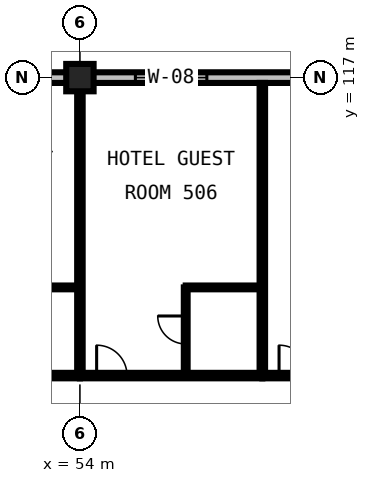
"""IFC4 building model, lengths in metres.
Left out: names, types, materials, properties, quantities, classifications, styles, units other than length and angle.
Written with IfcOpenShell. Run it as: python <this file> out.ifc"""

import sys

from ifc_helpers import new_model, si_unit, direction, frame, frame_2d, origin, origin_2d, place, context, subcontext, project, spatial, rectangle, extrude, element, fill, save


model = new_model("IFC4")
c1 = context("Model", 3, precision=1e-05, world=origin(), true_north=direction((0.0, 1.0)))
c2 = subcontext(c1, "Body", "Model", "MODEL_VIEW")
j1 = project(units=[si_unit("LENGTHUNIT", "METRE"), si_unit("PLANEANGLEUNIT", "RADIAN")], contexts=[c1])
p1 = place(None, origin())
s1 = spatial("IfcSite", under=j1, at=p1, CompositionType="ELEMENT")
p2 = place(p1, origin())
s2 = spatial("IfcBuilding", under=s1, at=p2, CompositionType="ELEMENT")
p3 = place(p2, frame((0.0, 0.0, 27.6)))
s3 = spatial("IfcBuildingStorey", under=s2, at=p3, CompositionType="ELEMENT", Elevation=27.6)
p4 = place(p3, frame((54.0, 117.0, 0.0), z_axis=(0.0, 0.0, 1.0), x_axis=(1.0, 0.0, 0.0)))
e1 = element("IfcColumn", 1, at=p4, inside=s3, PredefinedType="COLUMN", context=c2, shape_type="SweptSolid", body=[
    extrude(rectangle(XDim=0.9, YDim=0.9, at=origin_2d()), origin(), (0.0, 0.0, 1.0), 3.6),
])
p5 = place(p3, frame((54.0, 117.0, 0.0), z_axis=(0.0, 0.0, 1.0), x_axis=(-1.0, 0.0, 0.0)))
e2 = element("IfcWall", 2, at=p5, inside=s3, PredefinedType="STANDARD", context=c2, shape_type="SweptSolid", body=[
    extrude(rectangle(XDim=12.0, YDim=0.35, at=frame_2d((6.0, 0.0))), origin(), (0.0, 0.0, 1.0), 2.486),
])
p6 = place(p5, frame((1.9, 0.0, 0.75)))
e3 = element("IfcOpeningElement", 3, at=p6, cuts=e2, PredefinedType="OPENING", context=c2, shape_type="SweptSolid", body=[
    extrude(rectangle(XDim=2.2, YDim=1.6, at=frame_2d((1.1, 0.8))), frame((0.0, 0.19, 0.0), z_axis=(0.0, -1.0, 0.0), x_axis=(1.0, 0.0, 0.0)), (0.0, 0.0, 1.0), 0.38),
])
p7 = place(p5, frame((7.825, 0.0, 0.75)))
e4 = element("IfcOpeningElement", 4, at=p7, cuts=e2, PredefinedType="OPENING", context=c2, shape_type="SweptSolid", body=[
    extrude(rectangle(XDim=2.35, YDim=1.6, at=frame_2d((1.175, 0.8))), frame((0.0, 0.19, 0.0), z_axis=(0.0, -1.0, 0.0), x_axis=(1.0, 0.0, 0.0)), (0.0, 0.0, 1.0), 0.38),
])
p8 = place(p3, frame((66.0, 117.0, 0.0), z_axis=(0.0, 0.0, 1.0), x_axis=(-1.0, 0.0, 0.0)))
e5 = element("IfcWall", 5, at=p8, inside=s3, PredefinedType="STANDARD", context=c2, shape_type="SweptSolid", body=[
    extrude(rectangle(XDim=12.0, YDim=0.35, at=frame_2d((6.0, 0.0))), origin(), (0.0, 0.0, 1.0), 2.486),
])
p9 = place(p8, frame((1.9, 0.0, 0.75)))
e6 = element("IfcOpeningElement", 6, at=p9, cuts=e5, PredefinedType="OPENING", context=c2, shape_type="SweptSolid", body=[
    extrude(rectangle(XDim=2.2, YDim=1.6, at=frame_2d((1.1, 0.8))), frame((0.0, 0.19, 0.0), z_axis=(0.0, -1.0, 0.0), x_axis=(1.0, 0.0, 0.0)), (0.0, 0.0, 1.0), 0.38),
])
p10 = place(p8, frame((7.825, 0.0, 0.75)))
e7 = element("IfcOpeningElement", 7, at=p10, cuts=e5, PredefinedType="OPENING", context=c2, shape_type="SweptSolid", body=[
    extrude(rectangle(XDim=2.35, YDim=1.6, at=frame_2d((1.175, 0.8))), frame((0.0, 0.19, 0.0), z_axis=(0.0, -1.0, 0.0), x_axis=(1.0, 0.0, 0.0)), (0.0, 0.0, 1.0), 0.38),
])
p11 = place(p3, frame((48.0, 107.2, 0.0), z_axis=(0.0, 0.0, 1.0), x_axis=(1.0, 0.0, 0.0)))
e8 = element("IfcWall", 8, at=p11, inside=s3, PredefinedType="PARTITIONING", context=c2, shape_type="SweptSolid", body=[
    extrude(rectangle(XDim=6.0, YDim=0.18, at=frame_2d((3.0, 0.0))), origin(), (0.0, 0.0, 1.0), 3.29),
])
p12 = place(p11, frame((0.55, 0.0, 0.0)))
e9 = element("IfcOpeningElement", 9, at=p12, cuts=e8, PredefinedType="OPENING", context=c2, shape_type="SweptSolid", body=[
    extrude(rectangle(XDim=1.0, YDim=2.15, at=frame_2d((0.5, 1.075))), frame((0.0, 0.105, 0.0), z_axis=(0.0, -1.0, 0.0), x_axis=(1.0, 0.0, 0.0)), (0.0, 0.0, 1.0), 0.21),
])
p13 = place(p3, frame((54.0, 107.2, 0.0), z_axis=(0.0, 0.0, 1.0), x_axis=(0.0, 1.0, 0.0)))
e10 = element("IfcWall", 10, at=p13, inside=s3, PredefinedType="PARTITIONING", context=c2, shape_type="SweptSolid", body=[
    extrude(rectangle(XDim=9.625, YDim=0.18, at=frame_2d((4.812, 0.0))), origin(), (0.0, 0.0, 1.0), 2.59),
])
p14 = place(p3, frame((51.48, 110.1, 0.0), z_axis=(0.0, 0.0, 1.0), x_axis=(1.0, 0.0, 0.0)))
e11 = element("IfcWall", 11, at=p14, inside=s3, PredefinedType="PARTITIONING", context=c2, shape_type="SweptSolid", body=[
    extrude(rectangle(XDim=2.52, YDim=0.125, at=frame_2d((1.26, 0.0))), origin(), (0.0, 0.0, 1.0), 3.29),
])
p15 = place(p3, frame((54.0, 107.2, 0.0), z_axis=(0.0, 0.0, 1.0), x_axis=(1.0, 0.0, 0.0)))
e12 = element("IfcWall", 12, at=p15, inside=s3, PredefinedType="PARTITIONING", context=c2, shape_type="SweptSolid", body=[
    extrude(rectangle(XDim=6.0, YDim=0.18, at=frame_2d((3.0, 0.0))), origin(), (0.0, 0.0, 1.0), 3.29),
])
p16 = place(p15, frame((0.55, 0.0, 0.0)))
e13 = element("IfcOpeningElement", 13, at=p16, cuts=e12, PredefinedType="OPENING", context=c2, shape_type="SweptSolid", body=[
    extrude(rectangle(XDim=1.0, YDim=2.15, at=frame_2d((0.5, 1.075))), frame((0.0, 0.105, 0.0), z_axis=(0.0, -1.0, 0.0), x_axis=(1.0, 0.0, 0.0)), (0.0, 0.0, 1.0), 0.21),
])
p17 = place(p3, frame((60.0, 107.2, 0.0), z_axis=(0.0, 0.0, 1.0), x_axis=(0.0, 1.0, 0.0)))
e14 = element("IfcWall", 14, at=p17, inside=s3, PredefinedType="PARTITIONING", context=c2, shape_type="SweptSolid", body=[
    extrude(rectangle(XDim=9.625, YDim=0.18, at=frame_2d((4.812, 0.0))), origin(), (0.0, 0.0, 1.0), 3.29),
])
p18 = place(p3, frame((57.48, 107.29, 0.0), z_axis=(0.0, 0.0, 1.0), x_axis=(0.0, 1.0, 0.0)))
e15 = element("IfcWall", 15, at=p18, inside=s3, PredefinedType="PARTITIONING", context=c2, shape_type="SweptSolid", body=[
    extrude(rectangle(XDim=2.81, YDim=0.125, at=frame_2d((1.405, 0.0))), origin(), (0.0, 0.0, 1.0), 3.29),
])
p19 = place(p18, frame((0.95, 0.0, 0.0)))
e16 = element("IfcOpeningElement", 16, at=p19, cuts=e15, PredefinedType="OPENING", context=c2, shape_type="SweptSolid", body=[
    extrude(rectangle(XDim=0.92, YDim=2.1, at=frame_2d((0.46, 1.05))), frame((0.0, 0.077, 0.0), z_axis=(0.0, -1.0, 0.0), x_axis=(1.0, 0.0, 0.0)), (0.0, 0.0, 1.0), 0.155),
])
p20 = place(p3, frame((57.48, 110.1, 0.0), z_axis=(0.0, 0.0, 1.0), x_axis=(1.0, 0.0, 0.0)))
e17 = element("IfcWall", 17, at=p20, inside=s3, PredefinedType="PARTITIONING", context=c2, shape_type="SweptSolid", body=[
    extrude(rectangle(XDim=2.52, YDim=0.125, at=frame_2d((1.26, 0.0))), origin(), (0.0, 0.0, 1.0), 3.29),
])
p21 = place(p3, frame((60.0, 107.2, 0.0), z_axis=(0.0, 0.0, 1.0), x_axis=(1.0, 0.0, 0.0)))
e18 = element("IfcWall", 18, at=p21, inside=s3, PredefinedType="PARTITIONING", context=c2, shape_type="SweptSolid", body=[
    extrude(rectangle(XDim=6.0, YDim=0.18, at=frame_2d((3.0, 0.0))), origin(), (0.0, 0.0, 1.0), 3.29),
])
p22 = place(p21, frame((0.55, 0.0, 0.0)))
e19 = element("IfcOpeningElement", 19, at=p22, cuts=e18, PredefinedType="OPENING", context=c2, shape_type="SweptSolid", body=[
    extrude(rectangle(XDim=1.0, YDim=2.15, at=frame_2d((0.5, 1.075))), frame((0.0, 0.105, 0.0), z_axis=(0.0, -1.0, 0.0), x_axis=(1.0, 0.0, 0.0)), (0.0, 0.0, 1.0), 0.21),
])
p23 = place(p10, origin())
e20 = element("IfcWindow", 20, at=p23, inside=s3, PartitioningType="DOUBLE_PANEL_VERTICAL", PredefinedType="WINDOW", context=c2, shape_type="SweptSolid", body=[
    extrude(rectangle(XDim=2.35, YDim=1.6, at=frame_2d((1.175, 0.8))), frame((0.0, 0.03, 0.0), z_axis=(0.0, -1.0, 0.0), x_axis=(1.0, 0.0, 0.0)), (0.0, 0.0, 1.0), 0.06),
])
fill(e7, e20)
p24 = place(p16, origin())
e21 = element("IfcDoor", 21, at=p24, inside=s3, OperationType="SINGLE_SWING_LEFT", PredefinedType="DOOR", context=c2, shape_type="SweptSolid", body=[
    extrude(rectangle(XDim=1.0, YDim=2.15, at=frame_2d((0.5, 1.075))), frame((0.0, 0.025, 0.0), z_axis=(0.0, -1.0, 0.0), x_axis=(1.0, 0.0, 0.0)), (0.0, 0.0, 1.0), 0.05),
])
fill(e13, e21)
p25 = place(p19, origin())
e22 = element("IfcDoor", 22, at=p25, inside=s3, OperationType="SINGLE_SWING_RIGHT", PredefinedType="DOOR", context=c2, shape_type="SweptSolid", body=[
    extrude(rectangle(XDim=0.92, YDim=2.1, at=frame_2d((0.46, 1.05))), frame((0.0, 0.025, 0.0), z_axis=(0.0, -1.0, 0.0), x_axis=(1.0, 0.0, 0.0)), (0.0, 0.0, 1.0), 0.05),
])
fill(e16, e22)
p26 = place(p22, origin())
e23 = element("IfcDoor", 23, at=p26, inside=s3, OperationType="SINGLE_SWING_LEFT", PredefinedType="DOOR", context=c2, shape_type="SweptSolid", body=[
    extrude(rectangle(XDim=1.0, YDim=2.15, at=frame_2d((0.5, 1.075))), frame((0.0, 0.025, 0.0), z_axis=(0.0, -1.0, 0.0), x_axis=(1.0, 0.0, 0.0)), (0.0, 0.0, 1.0), 0.05),
])
fill(e19, e23)
save(model, sys.argv[1])
